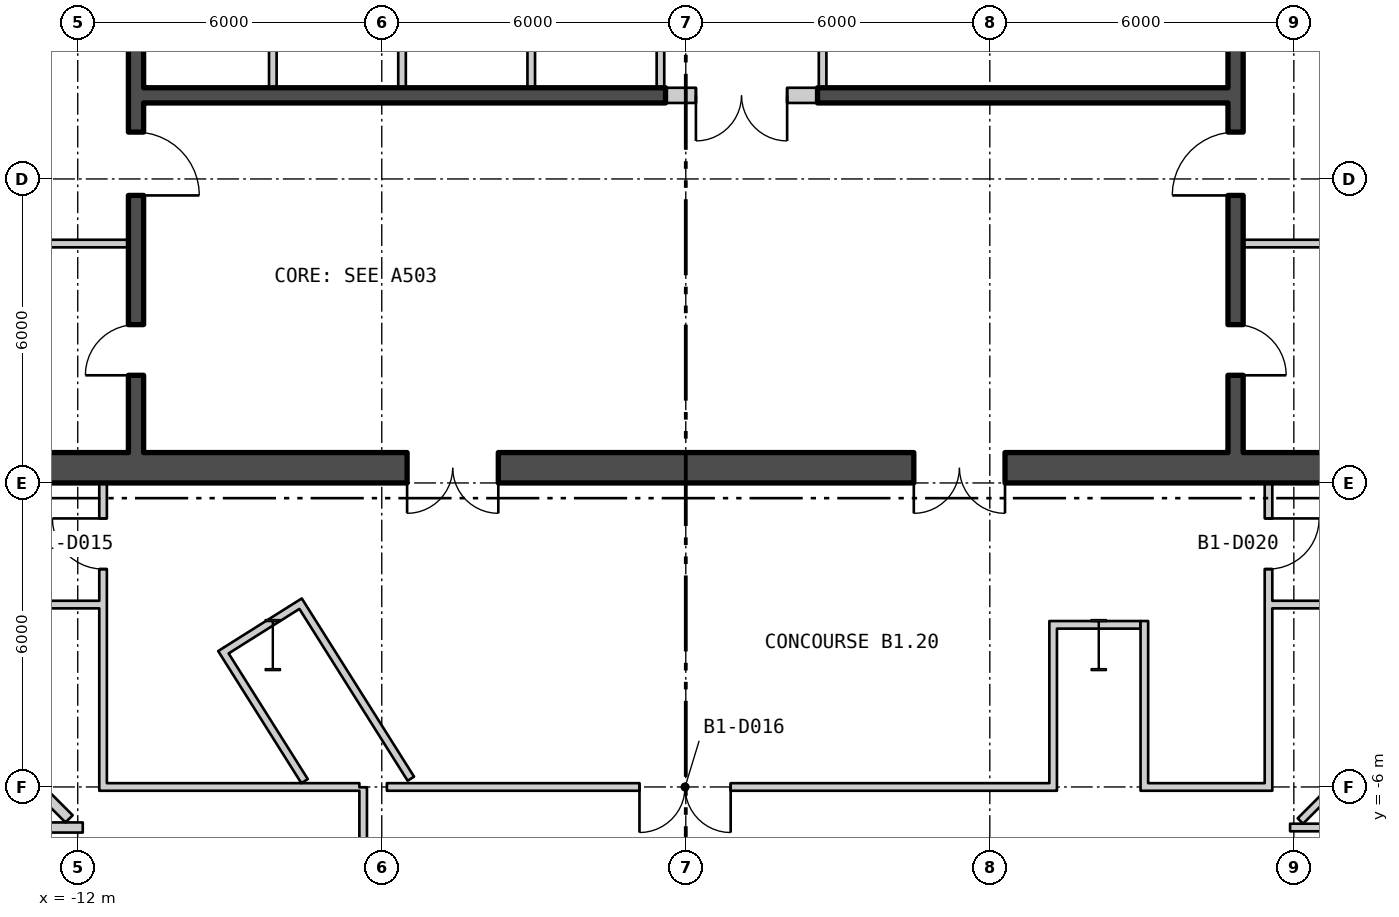
"""IFC4 building model, lengths in metres.
Left out: names, types, materials, properties, quantities, classifications, styles, units other than length and angle.
Written with IfcOpenShell. Run it as: python <this file> out.ifc"""

import sys

from ifc_helpers import new_model, si_unit, direction, frame, frame_2d, origin, origin_2d, place, context, subcontext, project, spatial, rectangle, i_section, extrude, element, fill, save


model = new_model("IFC4")
c1 = context("Model", 3, precision=1e-05, world=origin(), true_north=direction((0.0, 1.0)))
c2 = subcontext(c1, "Body", "Model", "MODEL_VIEW")
j1 = project(units=[si_unit("LENGTHUNIT", "METRE"), si_unit("PLANEANGLEUNIT", "RADIAN")], contexts=[c1])
p1 = place(None, origin())
s1 = spatial("IfcSite", under=j1, at=p1, CompositionType="ELEMENT")
p2 = place(p1, origin())
s2 = spatial("IfcBuilding", under=s1, at=p2, CompositionType="ELEMENT")
p3 = place(p2, frame((0.0, 0.0, -5.7)))
s3 = spatial("IfcBuildingStorey", under=s2, at=p3, CompositionType="ELEMENT", Elevation=-5.7)
for number, where, z_axis, x_axis in (
    (1, (8.15, -3.2, 0.0), (0.0, 0.0, 1.0), (1.0, 0.0, 0.0)),
    (2, (-8.15, -3.2, 0.0), (0.0, 0.0, 1.0), (1.0, 0.0, 0.0)),
):
    element("IfcColumn", number, at=place(p3, frame(where, z_axis=z_axis, x_axis=x_axis)), inside=s3, PredefinedType="COLUMN", context=c2, shape_type="SweptSolid", body=[
        extrude(i_section(OverallWidth=0.302, OverallDepth=1.008, WebThickness=0.021, FlangeThickness=0.04, at=origin_2d()), origin(), (0.0, 0.0, 1.0), 5.7),
    ])
p4 = place(p3, frame((-17.5, 0.3, 0.0), z_axis=(0.0, 0.0, 1.0), x_axis=(1.0, 0.0, 0.0)))
e3 = element("IfcWall", 3, at=p4, inside=s3, PredefinedType="SHEAR", context=c2, shape_type="SweptSolid", body=[
    extrude(rectangle(XDim=35.0, YDim=0.6, at=frame_2d((17.5, 0.0))), origin(), (0.0, 0.0, 1.0), 5.25),
])
p5 = place(p4, frame((12.0, 0.0, 0.0)))
e4 = element("IfcOpeningElement", 4, at=p5, cuts=e3, PredefinedType="OPENING", context=c2, shape_type="SweptSolid", body=[
    extrude(rectangle(XDim=1.8, YDim=2.4, at=frame_2d((0.9, 1.2))), frame((0.0, 0.31, 0.0), z_axis=(0.0, -1.0, 0.0), x_axis=(1.0, 0.0, 0.0)), (0.0, 0.0, 1.0), 0.62),
])
p6 = place(p4, frame((22.0, 0.0, 0.0)))
e5 = element("IfcOpeningElement", 5, at=p6, cuts=e3, PredefinedType="OPENING", context=c2, shape_type="SweptSolid", body=[
    extrude(rectangle(XDim=1.8, YDim=2.4, at=frame_2d((0.9, 1.2))), frame((0.0, 0.31, 0.0), z_axis=(0.0, -1.0, 0.0), x_axis=(1.0, 0.0, 0.0)), (0.0, 0.0, 1.0), 0.62),
])
p7 = place(p3, frame((-10.85, 0.6, 0.0), z_axis=(0.0, 0.0, 1.0), x_axis=(0.0, 1.0, 0.0)))
e6 = element("IfcWall", 6, at=p7, inside=s3, PredefinedType="SHEAR", context=c2, shape_type="SweptSolid", body=[
    extrude(rectangle(XDim=16.8, YDim=0.3, at=frame_2d((8.4, 0.0))), origin(), (0.0, 0.0, 1.0), 5.25),
])
p8 = place(p7, frame((5.075, 0.0, 0.0)))
e7 = element("IfcOpeningElement", 7, at=p8, cuts=e6, PredefinedType="OPENING", context=c2, shape_type="SweptSolid", body=[
    extrude(rectangle(XDim=1.25, YDim=2.1, at=frame_2d((0.625, 1.05))), frame((0.0, 0.16, 0.0), z_axis=(0.0, -1.0, 0.0), x_axis=(1.0, 0.0, 0.0)), (0.0, 0.0, 1.0), 0.32),
])
p9 = place(p7, frame((1.525, 0.0, 0.0)))
e8 = element("IfcOpeningElement", 8, at=p9, cuts=e6, PredefinedType="OPENING", context=c2, shape_type="SweptSolid", body=[
    extrude(rectangle(XDim=1.0, YDim=2.1, at=frame_2d((0.5, 1.05))), frame((0.0, 0.16, 0.0), z_axis=(0.0, -1.0, 0.0), x_axis=(1.0, 0.0, 0.0)), (0.0, 0.0, 1.0), 0.32),
])
p10 = place(p3, frame((10.85, 0.6, 0.0), z_axis=(0.0, 0.0, 1.0), x_axis=(0.0, 1.0, 0.0)))
e9 = element("IfcWall", 9, at=p10, inside=s3, PredefinedType="SHEAR", context=c2, shape_type="SweptSolid", body=[
    extrude(rectangle(XDim=16.8, YDim=0.3, at=frame_2d((8.4, 0.0))), origin(), (0.0, 0.0, 1.0), 5.25),
])
p11 = place(p10, frame((5.075, 0.0, 0.0)))
e10 = element("IfcOpeningElement", 10, at=p11, cuts=e9, PredefinedType="OPENING", context=c2, shape_type="SweptSolid", body=[
    extrude(rectangle(XDim=1.25, YDim=2.1, at=frame_2d((0.625, 1.05))), frame((0.0, 0.16, 0.0), z_axis=(0.0, -1.0, 0.0), x_axis=(1.0, 0.0, 0.0)), (0.0, 0.0, 1.0), 0.32),
])
p12 = place(p10, frame((1.525, 0.0, 0.0)))
e11 = element("IfcOpeningElement", 11, at=p12, cuts=e9, PredefinedType="OPENING", context=c2, shape_type="SweptSolid", body=[
    extrude(rectangle(XDim=1.0, YDim=2.1, at=frame_2d((0.5, 1.05))), frame((0.0, 0.16, 0.0), z_axis=(0.0, -1.0, 0.0), x_axis=(1.0, 0.0, 0.0)), (0.0, 0.0, 1.0), 0.32),
])
p13 = place(p3, frame((-10.7, 7.65, 0.0), z_axis=(0.0, 0.0, 1.0), x_axis=(1.0, 0.0, 0.0)))
e12 = element("IfcWall", 12, at=p13, inside=s3, PredefinedType="SHEAR", context=c2, shape_type="SweptSolid", body=[
    extrude(rectangle(XDim=10.3, YDim=0.3, at=frame_2d((5.15, 0.0))), origin(), (0.0, 0.0, 1.0), 5.25),
])
p14 = place(p3, frame((2.6, 7.65, 0.0), z_axis=(0.0, 0.0, 1.0), x_axis=(1.0, 0.0, 0.0)))
e13 = element("IfcWall", 13, at=p14, inside=s3, PredefinedType="SHEAR", context=c2, shape_type="SweptSolid", body=[
    extrude(rectangle(XDim=8.1, YDim=0.3, at=frame_2d((4.05, 0.0))), origin(), (0.0, 0.0, 1.0), 5.25),
])
for number, where, z_axis, x_axis in (
    (14, (-8.15, 7.8, 0.0), (0.0, 0.0, 1.0), (0.0, 1.0, 0.0)),
    (15, (-5.6, 7.8, 0.0), (0.0, 0.0, 1.0), (0.0, 1.0, 0.0)),
    (16, (-3.05, 7.8, 0.0), (0.0, 0.0, 1.0), (0.0, 1.0, 0.0)),
    (17, (-0.5, 7.8, 0.0), (0.0, 0.0, 1.0), (0.0, 1.0, 0.0)),
    (18, (2.7, 7.8, 0.0), (0.0, 0.0, 1.0), (0.0, 1.0, 0.0)),
):
    element("IfcWall", number, at=place(p3, frame(where, z_axis=z_axis, x_axis=x_axis)), inside=s3, PredefinedType="PARTITIONING", context=c2, shape_type="SweptSolid", body=[
        extrude(rectangle(XDim=2.7, YDim=0.15, at=frame_2d((1.35, 0.0))), origin(), (0.0, 0.0, 1.0), 5.25),
    ])
for number, where, z_axis, x_axis in (
    (19, (-14.2, 4.725, 0.0), (0.0, 0.0, 1.0), (1.0, 0.0, 0.0)),
    (20, (11.0, 4.725, 0.0), (0.0, 0.0, 1.0), (1.0, 0.0, 0.0)),
):
    element("IfcWall", number, at=place(p3, frame(where, z_axis=z_axis, x_axis=x_axis)), inside=s3, PredefinedType="PARTITIONING", context=c2, shape_type="SweptSolid", body=[
        extrude(rectangle(XDim=3.2, YDim=0.15, at=frame_2d((1.6, 0.0))), origin(), (0.0, 0.0, 1.0), 5.25),
    ])
p15 = place(p3, frame((-0.4, 7.65, 0.0), z_axis=(0.0, 0.0, 1.0), x_axis=(1.0, 0.0, 0.0)))
e21 = element("IfcWall", 21, at=p15, inside=s3, PredefinedType="PARTITIONING", context=c2, shape_type="SweptSolid", body=[
    extrude(rectangle(XDim=3.0, YDim=0.3, at=frame_2d((1.5, 0.0))), origin(), (0.0, 0.0, 1.0), 5.25),
])
p16 = place(p15, frame((0.6, 0.0, 0.0)))
e22 = element("IfcOpeningElement", 22, at=p16, cuts=e21, PredefinedType="OPENING", context=c2, shape_type="SweptSolid", body=[
    extrude(rectangle(XDim=1.8, YDim=2.4, at=frame_2d((0.9, 1.2))), frame((0.0, 0.16, 0.0), z_axis=(0.0, -1.0, 0.0), x_axis=(1.0, 0.0, 0.0)), (0.0, 0.0, 1.0), 0.32),
])
p17 = place(p3, frame((-17.2, -6.799, 0.0), z_axis=(0.0, 0.0, 1.0), x_axis=(0.999999982193, -0.000188714848, 0.0)))
e23 = element("IfcWall", 23, at=p17, inside=s3, PredefinedType="PARTITIONING", context=c2, shape_type="SweptSolid", body=[
    extrude(rectangle(XDim=5.299, YDim=0.2, at=frame_2d((2.65, 0.0))), origin(), (0.0, 0.0, 1.0), 5.25),
])
p18 = place(p3, frame((-12.721, -2.4, 0.0), z_axis=(0.0, 0.0, 1.0), x_axis=(1.0, 0.0, 0.0)))
e24 = element("IfcWall", 24, at=p18, inside=s3, PredefinedType="PARTITIONING", context=c2, shape_type="SweptSolid", body=[
    extrude(rectangle(XDim=1.146, YDim=0.15, at=frame_2d((0.573, 0.0))), origin(), (0.0, 0.0, 1.0), 5.25),
])
p19 = place(p3, frame((-12.633, -6.167, 0.0), z_axis=(0.0, 0.0, 1.0), x_axis=(0.707106781187, -0.707106781187, 0.0)))
e25 = element("IfcWall", 25, at=p19, inside=s3, PredefinedType="PARTITIONING", context=c2, shape_type="SweptSolid", body=[
    extrude(rectangle(XDim=0.653, YDim=0.2, at=frame_2d((0.327, 0.0))), origin(), (0.0, 0.0, 1.0), 5.25),
])
p20 = place(p3, frame((-11.5, -6.075, 0.0), z_axis=(0.0, 0.0, 1.0), x_axis=(0.0, 1.0, 0.0)))
e26 = element("IfcWall", 26, at=p20, inside=s3, PredefinedType="PARTITIONING", context=c2, shape_type="SweptSolid", body=[
    extrude(rectangle(XDim=6.075, YDim=0.15, at=frame_2d((3.038, 0.0))), origin(), (0.0, 0.0, 1.0), 5.25),
])
p21 = place(p20, frame((4.375, 0.0, 0.0)))
e27 = element("IfcOpeningElement", 27, at=p21, cuts=e26, PredefinedType="OPENING", context=c2, shape_type="SweptSolid", body=[
    extrude(rectangle(XDim=1.0, YDim=2.1, at=frame_2d((0.5, 1.05))), frame((0.0, 0.085, 0.0), z_axis=(0.0, -1.0, 0.0), x_axis=(1.0, 0.0, 0.0)), (0.0, 0.0, 1.0), 0.17),
])
p22 = place(p3, frame((-11.425, -6.0, 0.0), z_axis=(0.0, 0.0, 1.0), x_axis=(1.0, 0.0, 0.0)))
e28 = element("IfcWall", 28, at=p22, inside=s3, PredefinedType="PARTITIONING", context=c2, shape_type="SweptSolid", body=[
    extrude(rectangle(XDim=4.983, YDim=0.15, at=frame_2d((2.491, 0.0))), origin(), (0.0, 0.0, 1.0), 5.25),
])
p23 = place(p3, frame((-9.165, -3.278, 0.0), z_axis=(0.0, 0.0, 1.0), x_axis=(0.532942389679, -0.846151528559, 0.0)))
e29 = element("IfcWall", 29, at=p23, inside=s3, PredefinedType="PARTITIONING", context=c2, shape_type="SweptSolid", body=[
    extrude(rectangle(XDim=3.081, YDim=0.15, at=frame_2d((1.54, 0.0))), origin(), (0.0, 0.0, 1.0), 5.25),
])
p24 = place(p3, frame((-9.062, -3.301, 0.0), z_axis=(0.0, 0.0, 1.0), x_axis=(0.846394682691, 0.53255613893, 0.0)))
e30 = element("IfcWall", 30, at=p24, inside=s3, PredefinedType="PARTITIONING", context=c2, shape_type="SweptSolid", body=[
    extrude(rectangle(XDim=1.651, YDim=0.15, at=frame_2d((0.825, 0.0))), origin(), (0.0, 0.0, 1.0), 5.25),
])
p25 = place(p3, frame((-7.642, -2.319, 0.0), z_axis=(0.0, 0.0, 1.0), x_axis=(0.532979114911, -0.846128396326, 0.0)))
e31 = element("IfcWall", 31, at=p25, inside=s3, PredefinedType="PARTITIONING", context=c2, shape_type="SweptSolid", body=[
    extrude(rectangle(XDim=4.158, YDim=0.15, at=frame_2d((2.079, 0.0))), origin(), (0.0, 0.0, 1.0), 5.25),
])
p26 = place(p3, frame((-6.367, -12.925, 0.0), z_axis=(0.0, 0.0, 1.0), x_axis=(0.0, 1.0, 0.0)))
e32 = element("IfcWall", 32, at=p26, inside=s3, PredefinedType="PARTITIONING", context=c2, shape_type="SweptSolid", body=[
    extrude(rectangle(XDim=6.919, YDim=0.15, at=frame_2d((3.459, 0.0))), origin(), (0.0, 0.0, 1.0), 5.25),
])
p27 = place(p3, frame((-5.899, -6.0, 0.0), z_axis=(0.0, 0.0, 1.0), x_axis=(1.0, 0.0, 0.0)))
e33 = element("IfcWall", 33, at=p27, inside=s3, PredefinedType="PARTITIONING", context=c2, shape_type="SweptSolid", body=[
    extrude(rectangle(XDim=13.224, YDim=0.15, at=frame_2d((6.612, 0.0))), origin(), (0.0, 0.0, 1.0), 5.25),
])
p28 = place(p27, frame((4.985, 0.0, 0.0)))
e34 = element("IfcOpeningElement", 34, at=p28, cuts=e33, PredefinedType="OPENING", context=c2, shape_type="SweptSolid", body=[
    extrude(rectangle(XDim=1.8, YDim=2.1, at=frame_2d((0.9, 1.05))), frame((0.0, 0.085, 0.0), z_axis=(0.0, -1.0, 0.0), x_axis=(1.0, 0.0, 0.0)), (0.0, 0.0, 1.0), 0.17),
])
p29 = place(p3, frame((7.25, -5.925, 0.0), z_axis=(0.0, 0.0, 1.0), x_axis=(0.0, 1.0, 0.0)))
e35 = element("IfcWall", 35, at=p29, inside=s3, PredefinedType="PARTITIONING", context=c2, shape_type="SweptSolid", body=[
    extrude(rectangle(XDim=3.2, YDim=0.15, at=frame_2d((1.6, 0.0))), origin(), (0.0, 0.0, 1.0), 5.25),
])
p30 = place(p3, frame((7.325, -2.8, 0.0), z_axis=(0.0, 0.0, 1.0), x_axis=(1.0, 0.0, 0.0)))
e36 = element("IfcWall", 36, at=p30, inside=s3, PredefinedType="PARTITIONING", context=c2, shape_type="SweptSolid", body=[
    extrude(rectangle(XDim=1.65, YDim=0.15, at=frame_2d((0.825, 0.0))), origin(), (0.0, 0.0, 1.0), 5.25),
])
p31 = place(p3, frame((9.05, -6.075, 0.0), z_axis=(0.0, 0.0, 1.0), x_axis=(0.0, 1.0, 0.0)))
e37 = element("IfcWall", 37, at=p31, inside=s3, PredefinedType="PARTITIONING", context=c2, shape_type="SweptSolid", body=[
    extrude(rectangle(XDim=3.35, YDim=0.15, at=frame_2d((1.675, 0.0))), origin(), (0.0, 0.0, 1.0), 5.25),
])
p32 = place(p3, frame((9.125, -6.0, 0.0), z_axis=(0.0, 0.0, 1.0), x_axis=(1.0, 0.0, 0.0)))
e38 = element("IfcWall", 38, at=p32, inside=s3, PredefinedType="PARTITIONING", context=c2, shape_type="SweptSolid", body=[
    extrude(rectangle(XDim=2.3, YDim=0.15, at=frame_2d((1.15, 0.0))), origin(), (0.0, 0.0, 1.0), 5.25),
])
p33 = place(p3, frame((11.5, -6.075, 0.0), z_axis=(0.0, 0.0, 1.0), x_axis=(0.0, 1.0, 0.0)))
e39 = element("IfcWall", 39, at=p33, inside=s3, PredefinedType="PARTITIONING", context=c2, shape_type="SweptSolid", body=[
    extrude(rectangle(XDim=6.075, YDim=0.15, at=frame_2d((3.038, 0.0))), origin(), (0.0, 0.0, 1.0), 5.25),
])
p34 = place(p33, frame((4.375, 0.0, 0.0)))
e40 = element("IfcOpeningElement", 40, at=p34, cuts=e39, PredefinedType="OPENING", context=c2, shape_type="SweptSolid", body=[
    extrude(rectangle(XDim=1.0, YDim=2.1, at=frame_2d((0.5, 1.05))), frame((0.0, 0.085, 0.0), z_axis=(0.0, -1.0, 0.0), x_axis=(1.0, 0.0, 0.0)), (0.0, 0.0, 1.0), 0.17),
])
p35 = place(p3, frame((11.575, -2.4, 0.0), z_axis=(0.0, 0.0, 1.0), x_axis=(1.0, 0.0, 0.0)))
e41 = element("IfcWall", 41, at=p35, inside=s3, PredefinedType="PARTITIONING", context=c2, shape_type="SweptSolid", body=[
    extrude(rectangle(XDim=5.45, YDim=0.15, at=frame_2d((2.725, 0.0))), origin(), (0.0, 0.0, 1.0), 5.25),
])
p36 = place(p35, frame((2.804, 0.0, 0.0)))
e42 = element("IfcOpeningElement", 42, at=p36, cuts=e41, PredefinedType="OPENING", context=c2, shape_type="SweptSolid", body=[
    extrude(rectangle(XDim=1.0, YDim=2.1, at=frame_2d((0.5, 1.05))), frame((0.0, 0.085, 0.0), z_axis=(0.0, -1.0, 0.0), x_axis=(1.0, 0.0, 0.0)), (0.0, 0.0, 1.0), 0.17),
])
p37 = place(p3, frame((11.926, -6.8, 0.0), z_axis=(0.0, 0.0, 1.0), x_axis=(1.0, 0.0, 0.0)))
e43 = element("IfcWall", 43, at=p37, inside=s3, PredefinedType="PARTITIONING", context=c2, shape_type="SweptSolid", body=[
    extrude(rectangle(XDim=5.099, YDim=0.15, at=frame_2d((2.55, 0.0))), origin(), (0.0, 0.0, 1.0), 5.25),
])
p38 = place(p3, frame((12.129, -6.672, 0.0), z_axis=(0.0, 0.0, 1.0), x_axis=(0.706438754443, 0.707774177419, 0.0)))
e44 = element("IfcWall", 44, at=p38, inside=s3, PredefinedType="PARTITIONING", context=c2, shape_type="SweptSolid", body=[
    extrude(rectangle(XDim=0.749, YDim=0.15, at=frame_2d((0.374, 0.0))), origin(), (0.0, 0.0, 1.0), 5.25),
])
p39 = place(p8, origin())
e45 = element("IfcDoor", 45, at=p39, inside=s3, OperationType="SINGLE_SWING_LEFT", PredefinedType="DOOR", context=c2, shape_type="SweptSolid", body=[
    extrude(rectangle(XDim=1.25, YDim=2.1, at=frame_2d((0.625, 1.05))), frame((0.0, 0.025, 0.0), z_axis=(0.0, -1.0, 0.0), x_axis=(1.0, 0.0, 0.0)), (0.0, 0.0, 1.0), 0.05),
])
fill(e7, e45)
p40 = place(p9, origin())
e46 = element("IfcDoor", 46, at=p40, inside=s3, OperationType="SINGLE_SWING_RIGHT", PredefinedType="DOOR", context=c2, shape_type="SweptSolid", body=[
    extrude(rectangle(XDim=1.0, YDim=2.1, at=frame_2d((0.5, 1.05))), frame((0.0, 0.025, 0.0), z_axis=(0.0, -1.0, 0.0), x_axis=(1.0, 0.0, 0.0)), (0.0, 0.0, 1.0), 0.05),
])
fill(e8, e46)
p41 = place(p11, origin())
e47 = element("IfcDoor", 47, at=p41, inside=s3, OperationType="SINGLE_SWING_RIGHT", PredefinedType="DOOR", context=c2, shape_type="SweptSolid", body=[
    extrude(rectangle(XDim=1.25, YDim=2.1, at=frame_2d((0.625, 1.05))), frame((0.0, 0.025, 0.0), z_axis=(0.0, -1.0, 0.0), x_axis=(1.0, 0.0, 0.0)), (0.0, 0.0, 1.0), 0.05),
])
fill(e10, e47)
p42 = place(p12, origin())
e48 = element("IfcDoor", 48, at=p42, inside=s3, OperationType="SINGLE_SWING_LEFT", PredefinedType="DOOR", context=c2, shape_type="SweptSolid", body=[
    extrude(rectangle(XDim=1.0, YDim=2.1, at=frame_2d((0.5, 1.05))), frame((0.0, 0.025, 0.0), z_axis=(0.0, -1.0, 0.0), x_axis=(1.0, 0.0, 0.0)), (0.0, 0.0, 1.0), 0.05),
])
fill(e11, e48)
p43 = place(p16, origin())
e49 = element("IfcDoor", 49, at=p43, inside=s3, OperationType="DOUBLE_DOOR_SINGLE_SWING", PredefinedType="DOOR", context=c2, shape_type="SweptSolid", body=[
    extrude(rectangle(XDim=1.8, YDim=2.4, at=frame_2d((0.9, 1.2))), frame((0.0, 0.025, 0.0), z_axis=(0.0, -1.0, 0.0), x_axis=(1.0, 0.0, 0.0)), (0.0, 0.0, 1.0), 0.05),
])
fill(e22, e49)
p44 = place(p5, origin())
e50 = element("IfcDoor", 50, at=p44, inside=s3, OperationType="DOUBLE_DOOR_SINGLE_SWING", PredefinedType="DOOR", context=c2, shape_type="SweptSolid", body=[
    extrude(rectangle(XDim=1.8, YDim=2.4, at=frame_2d((0.9, 1.2))), frame((0.0, 0.025, 0.0), z_axis=(0.0, -1.0, 0.0), x_axis=(1.0, 0.0, 0.0)), (0.0, 0.0, 1.0), 0.05),
])
fill(e4, e50)
p45 = place(p6, origin())
e51 = element("IfcDoor", 51, at=p45, inside=s3, OperationType="DOUBLE_DOOR_SINGLE_SWING", PredefinedType="DOOR", context=c2, shape_type="SweptSolid", body=[
    extrude(rectangle(XDim=1.8, YDim=2.4, at=frame_2d((0.9, 1.2))), frame((0.0, 0.025, 0.0), z_axis=(0.0, -1.0, 0.0), x_axis=(1.0, 0.0, 0.0)), (0.0, 0.0, 1.0), 0.05),
])
fill(e5, e51)
p46 = place(p21, origin())
e52 = element("IfcDoor", 52, at=p46, inside=s3, OperationType="SINGLE_SWING_LEFT", PredefinedType="DOOR", context=c2, shape_type="SweptSolid", body=[
    extrude(rectangle(XDim=1.0, YDim=2.1, at=frame_2d((0.5, 1.05))), frame((0.0, 0.025, 0.0), z_axis=(0.0, -1.0, 0.0), x_axis=(1.0, 0.0, 0.0)), (0.0, 0.0, 1.0), 0.05),
])
fill(e27, e52)
p47 = place(p28, origin())
e53 = element("IfcDoor", 53, at=p47, inside=s3, OperationType="DOUBLE_DOOR_SINGLE_SWING", PredefinedType="DOOR", context=c2, shape_type="SweptSolid", body=[
    extrude(rectangle(XDim=1.8, YDim=2.1, at=frame_2d((0.9, 1.05))), frame((0.0, 0.025, 0.0), z_axis=(0.0, -1.0, 0.0), x_axis=(1.0, 0.0, 0.0)), (0.0, 0.0, 1.0), 0.05),
])
fill(e34, e53)
p48 = place(p34, origin())
e54 = element("IfcDoor", 54, at=p48, inside=s3, OperationType="SINGLE_SWING_RIGHT", PredefinedType="DOOR", context=c2, shape_type="SweptSolid", body=[
    extrude(rectangle(XDim=1.0, YDim=2.1, at=frame_2d((0.5, 1.05))), frame((0.0, 0.025, 0.0), z_axis=(0.0, -1.0, 0.0), x_axis=(1.0, 0.0, 0.0)), (0.0, 0.0, 1.0), 0.05),
])
fill(e40, e54)
save(model, sys.argv[1])
